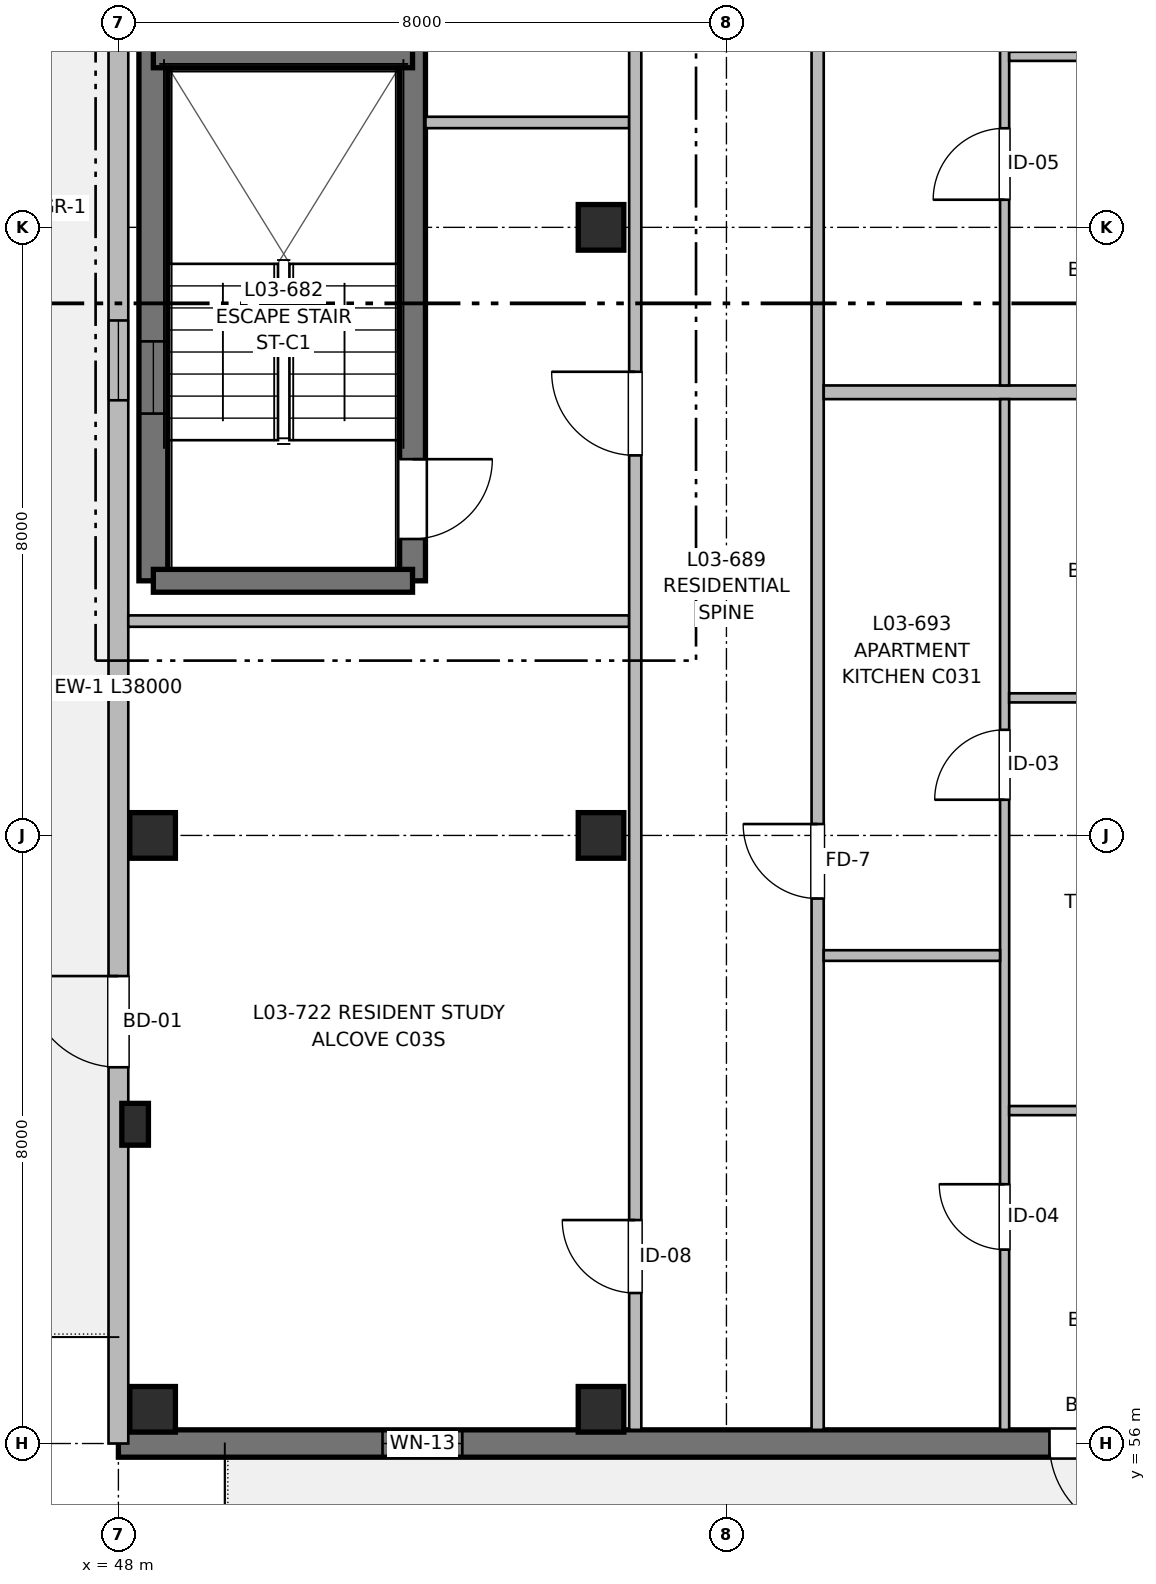
"""IFC4 building model, lengths in metres.
Left out: names, types, materials, properties, quantities, classifications, styles, units other than length and angle.
Written with IfcOpenShell. Run it as: python <this file> out.ifc"""

import sys

from ifc_helpers import new_model, si_unit, direction, frame, frame_2d, origin, origin_2d, place, context, subcontext, project, spatial, rectangle, extrude, element, fill, save


model = new_model("IFC4")
c1 = context("Model", 3, precision=1e-05, world=origin(), true_north=direction((0.0, 1.0)))
c2 = subcontext(c1, "Body", "Model", "MODEL_VIEW")
j1 = project(units=[si_unit("LENGTHUNIT", "METRE"), si_unit("PLANEANGLEUNIT", "RADIAN")], contexts=[c1])
p1 = place(None, origin())
s1 = spatial("IfcSite", under=j1, at=p1, CompositionType="ELEMENT")
p2 = place(p1, origin())
s2 = spatial("IfcBuilding", under=s1, at=p2, CompositionType="ELEMENT")
p3 = place(p2, frame((0.0, 0.0, 10.56)))
s3 = spatial("IfcBuildingStorey", under=s2, at=p3, CompositionType="ELEMENT", Elevation=10.56)
p4 = place(p3, frame((48.22, 60.2, 0.0), z_axis=(0.0, 0.0, 1.0), x_axis=(1.0, 0.0, 0.0)))
e1 = element("IfcColumn", 1, at=p4, inside=s3, PredefinedType="PILASTER", context=c2, shape_type="SweptSolid", body=[
    extrude(rectangle(XDim=0.35, YDim=0.55, at=origin_2d()), origin(), (0.0, 0.0, 1.0), 3.2),
])
for number, where, z_axis, x_axis in (
    (2, (48.45, 56.45, 0.0), (0.0, 0.0, 1.0), (1.0, 0.0, 0.0)),
    (3, (48.45, 64.0, 0.0), (0.0, 0.0, 1.0), (1.0, 0.0, 0.0)),
    (4, (54.35, 56.45, 0.0), (0.0, 0.0, 1.0), (1.0, 0.0, 0.0)),
    (5, (54.35, 64.0, 0.0), (0.0, 0.0, 1.0), (1.0, 0.0, 0.0)),
    (6, (54.35, 72.0, 0.0), (0.0, 0.0, 1.0), (1.0, 0.0, 0.0)),
):
    element("IfcColumn", number, at=place(p3, frame(where, z_axis=z_axis, x_axis=x_axis)), inside=s3, PredefinedType="COLUMN", context=c2, shape_type="SweptSolid", body=[
        extrude(rectangle(XDim=0.6, YDim=0.6, at=origin_2d()), origin(), (0.0, 0.0, 1.0), 3.2),
    ])
p5 = place(p3, frame((48.46, 67.35, 0.0), z_axis=(0.0, 0.0, 1.0), x_axis=(0.0, 1.0, 0.0)))
e7 = element("IfcWall", 7, at=p5, inside=s3, PredefinedType="SHEAR", context=c2, shape_type="SweptSolid", body=[
    extrude(rectangle(XDim=12.45, YDim=0.38, at=frame_2d((6.225, 0.0))), origin(), (0.0, 0.0, 1.0), 3.2),
])
p6 = place(p5, frame((2.2, 0.0, 0.97)))
e8 = element("IfcOpeningElement", 8, at=p6, cuts=e7, PredefinedType="OPENING", context=c2, shape_type="SweptSolid", body=[
    extrude(rectangle(XDim=0.95, YDim=1.25, at=frame_2d((0.475, 0.625))), frame((0.0, 0.2, 0.0), z_axis=(0.0, -1.0, 0.0), x_axis=(1.0, 0.0, 0.0)), (0.0, 0.0, 1.0), 0.4),
])
p7 = place(p3, frame((51.87, 79.8, 0.0), z_axis=(0.0, 0.0, 1.0), x_axis=(0.0, -1.0, 0.0)))
e9 = element("IfcWall", 9, at=p7, inside=s3, PredefinedType="SHEAR", context=c2, shape_type="SweptSolid", body=[
    extrude(rectangle(XDim=12.45, YDim=0.34, at=frame_2d((6.225, 0.0))), origin(), (0.0, 0.0, 1.0), 3.2),
])
p8 = place(p7, frame((10.85, 0.0, 0.0)))
e10 = element("IfcOpeningElement", 10, at=p8, cuts=e9, PredefinedType="OPENING", context=c2, shape_type="SweptSolid", body=[
    extrude(rectangle(XDim=1.05, YDim=2.15, at=frame_2d((0.525, 1.075))), frame((0.0, 0.18, 0.0), z_axis=(0.0, -1.0, 0.0), x_axis=(1.0, 0.0, 0.0)), (0.0, 0.0, 1.0), 0.36),
])
p9 = place(p3, frame((51.87, 67.35, 0.0), z_axis=(0.0, 0.0, 1.0), x_axis=(-1.0, 0.0, 0.0)))
e11 = element("IfcWall", 11, at=p9, inside=s3, PredefinedType="SHEAR", context=c2, shape_type="SweptSolid", body=[
    extrude(rectangle(XDim=3.41, YDim=0.3, at=frame_2d((1.705, 0.0))), origin(), (0.0, 0.0, 1.0), 3.2),
])
p10 = place(p3, frame((48.46, 74.24, 0.0), z_axis=(0.0, 0.0, 1.0), x_axis=(1.0, 0.0, 0.0)))
e12 = element("IfcWall", 12, at=p10, inside=s3, PredefinedType="SHEAR", context=c2, shape_type="SweptSolid", body=[
    extrude(rectangle(XDim=3.41, YDim=0.28, at=frame_2d((1.705, 0.0))), origin(), (0.0, 0.0, 1.0), 3.2),
])
p11 = place(p3, frame((64.0, 56.0, 0.0), z_axis=(0.0, 0.0, 1.0), x_axis=(-1.0, 0.0, 0.0)))
e13 = element("IfcWall", 13, at=p11, inside=s3, PredefinedType="SHEAR", context=c2, shape_type="SweptSolid", body=[
    extrude(rectangle(XDim=16.0, YDim=0.36, at=frame_2d((8.0, 0.0))), origin(), (0.0, 0.0, 1.0), 2.98),
])
p12 = place(p11, frame((2.55, 0.0, 0.0)))
e14 = element("IfcOpeningElement", 14, at=p12, cuts=e13, PredefinedType="OPENING", context=c2, shape_type="SweptSolid", body=[
    extrude(rectangle(XDim=1.2, YDim=2.2, at=frame_2d((0.6, 1.1))), frame((0.0, 0.19, 0.0), z_axis=(0.0, -1.0, 0.0), x_axis=(1.0, 0.0, 0.0)), (0.0, 0.0, 1.0), 0.38),
])
p13 = place(p11, frame((11.475, 0.0, 0.9)))
e15 = element("IfcOpeningElement", 15, at=p13, cuts=e13, PredefinedType="OPENING", context=c2, shape_type="SweptSolid", body=[
    extrude(rectangle(XDim=1.05, YDim=1.15, at=frame_2d((0.525, 0.575))), frame((0.0, 0.19, 0.0), z_axis=(0.0, -1.0, 0.0), x_axis=(1.0, 0.0, 0.0)), (0.0, 0.0, 1.0), 0.38),
])
p14 = place(p3, frame((48.0, 56.0, 0.0), z_axis=(0.0, 0.0, 1.0), x_axis=(0.0, 1.0, 0.0)))
e16 = element("IfcWall", 16, at=p14, inside=s3, PredefinedType="SOLIDWALL", context=c2, shape_type="SweptSolid", body=[
    extrude(rectangle(XDim=38.0, YDim=0.26, at=frame_2d((19.0, 0.0))), origin(), (0.0, 0.0, 1.0), 2.98),
])
p15 = place(p14, frame((4.95, 0.0, 0.0)))
e17 = element("IfcOpeningElement", 17, at=p15, cuts=e16, PredefinedType="OPENING", context=c2, shape_type="SweptSolid", body=[
    extrude(rectangle(XDim=1.2, YDim=2.2, at=frame_2d((0.6, 1.1))), frame((0.0, 0.14, 0.0), z_axis=(0.0, -1.0, 0.0), x_axis=(1.0, 0.0, 0.0)), (0.0, 0.0, 1.0), 0.28),
])
p16 = place(p14, frame((13.725, 0.0, 0.9)))
e18 = element("IfcOpeningElement", 18, at=p16, cuts=e16, PredefinedType="OPENING", context=c2, shape_type="SweptSolid", body=[
    extrude(rectangle(XDim=1.05, YDim=1.15, at=frame_2d((0.525, 0.575))), frame((0.0, 0.14, 0.0), z_axis=(0.0, -1.0, 0.0), x_axis=(1.0, 0.0, 0.0)), (0.0, 0.0, 1.0), 0.28),
])
p17 = place(p14, frame((24.0, 0.0, 0.9)))
e19 = element("IfcOpeningElement", 19, at=p17, cuts=e16, PredefinedType="OPENING", context=c2, shape_type="SweptSolid", body=[
    extrude(rectangle(XDim=1.2, YDim=1.05, at=frame_2d((0.6, 0.525))), frame((0.0, 0.14, 0.0), z_axis=(0.0, -1.0, 0.0), x_axis=(1.0, 0.0, 0.0)), (0.0, 0.0, 1.0), 0.28),
])
p18 = place(p14, frame((32.925, 0.0, 0.9)))
e20 = element("IfcOpeningElement", 20, at=p18, cuts=e16, PredefinedType="OPENING", context=c2, shape_type="SweptSolid", body=[
    extrude(rectangle(XDim=0.65, YDim=0.95, at=frame_2d((0.325, 0.475))), frame((0.0, 0.14, 0.0), z_axis=(0.0, -1.0, 0.0), x_axis=(1.0, 0.0, 0.0)), (0.0, 0.0, 1.0), 0.28),
])
p19 = place(p3, frame((48.13, 66.82, 0.0), z_axis=(0.0, 0.0, 1.0), x_axis=(1.0, 0.0, 0.0)))
e21 = element("IfcWall", 21, at=p19, inside=s3, PredefinedType="PARTITIONING", context=c2, shape_type="SweptSolid", body=[
    extrude(rectangle(XDim=6.59, YDim=0.15, at=frame_2d((3.295, 0.0))), origin(), (0.0, 0.0, 1.0), 2.935),
])
p20 = place(p3, frame((52.04, 73.38, 0.0), z_axis=(0.0, 0.0, 1.0), x_axis=(1.0, 0.0, 0.0)))
e22 = element("IfcWall", 22, at=p20, inside=s3, PredefinedType="PARTITIONING", context=c2, shape_type="SweptSolid", body=[
    extrude(rectangle(XDim=2.68, YDim=0.15, at=frame_2d((1.34, 0.0))), origin(), (0.0, 0.0, 1.0), 2.935),
])
p21 = place(p3, frame((54.8, 56.18, 0.0), z_axis=(0.0, 0.0, 1.0), x_axis=(0.0, 1.0, 0.0)))
e23 = element("IfcWall", 23, at=p21, inside=s3, PredefinedType="PARTITIONING", context=c2, shape_type="SweptSolid", body=[
    extrude(rectangle(XDim=50.62, YDim=0.16, at=frame_2d((25.31, 0.0))), origin(), (0.0, 0.0, 1.0), 2.935),
])
p22 = place(p21, frame((12.82, 0.0, 0.0)))
e24 = element("IfcOpeningElement", 24, at=p22, cuts=e23, PredefinedType="OPENING", context=c2, shape_type="SweptSolid", body=[
    extrude(rectangle(XDim=1.1, YDim=2.15, at=frame_2d((0.55, 1.075))), frame((0.0, 0.09, 0.0), z_axis=(0.0, -1.0, 0.0), x_axis=(1.0, 0.0, 0.0)), (0.0, 0.0, 1.0), 0.18),
])
p23 = place(p21, frame((19.22, 0.0, 0.0)))
e25 = element("IfcOpeningElement", 25, at=p23, cuts=e23, PredefinedType="OPENING", context=c2, shape_type="SweptSolid", body=[
    extrude(rectangle(XDim=1.6, YDim=2.15, at=frame_2d((0.8, 1.075))), frame((0.0, 0.09, 0.0), z_axis=(0.0, -1.0, 0.0), x_axis=(1.0, 0.0, 0.0)), (0.0, 0.0, 1.0), 0.18),
])
p24 = place(p21, frame((1.8, 0.0, 0.0)))
e26 = element("IfcOpeningElement", 26, at=p24, cuts=e23, PredefinedType="OPENING", context=c2, shape_type="SweptSolid", body=[
    extrude(rectangle(XDim=0.96, YDim=2.15, at=frame_2d((0.48, 1.075))), frame((0.0, 0.09, 0.0), z_axis=(0.0, -1.0, 0.0), x_axis=(1.0, 0.0, 0.0)), (0.0, 0.0, 1.0), 0.18),
])
p25 = place(p21, frame((32.825, 0.0, 0.0)))
e27 = element("IfcOpeningElement", 27, at=p25, cuts=e23, PredefinedType="OPENING", context=c2, shape_type="SweptSolid", body=[
    extrude(rectangle(XDim=0.98, YDim=2.15, at=frame_2d((0.49, 1.075))), frame((0.0, 0.09, 0.0), z_axis=(0.0, -1.0, 0.0), x_axis=(1.0, 0.0, 0.0)), (0.0, 0.0, 1.0), 0.18),
])
p26 = place(p21, frame((40.635, 0.0, 0.0)))
e28 = element("IfcOpeningElement", 28, at=p26, cuts=e23, PredefinedType="OPENING", context=c2, shape_type="SweptSolid", body=[
    extrude(rectangle(XDim=0.98, YDim=2.15, at=frame_2d((0.49, 1.075))), frame((0.0, 0.09, 0.0), z_axis=(0.0, -1.0, 0.0), x_axis=(1.0, 0.0, 0.0)), (0.0, 0.0, 1.0), 0.18),
])
p27 = place(p3, frame((57.2, 56.18, 0.0), z_axis=(0.0, 0.0, 1.0), x_axis=(0.0, 1.0, 0.0)))
e29 = element("IfcWall", 29, at=p27, inside=s3, PredefinedType="PARTITIONING", context=c2, shape_type="SweptSolid", body=[
    extrude(rectangle(XDim=50.62, YDim=0.16, at=frame_2d((25.31, 0.0))), origin(), (0.0, 0.0, 1.0), 2.935),
])
p28 = place(p27, frame((6.99, 0.0, 0.0)))
e30 = element("IfcOpeningElement", 30, at=p28, cuts=e29, PredefinedType="OPENING", context=c2, shape_type="SweptSolid", body=[
    extrude(rectangle(XDim=0.98, YDim=2.15, at=frame_2d((0.49, 1.075))), frame((0.0, 0.09, 0.0), z_axis=(0.0, -1.0, 0.0), x_axis=(1.0, 0.0, 0.0)), (0.0, 0.0, 1.0), 0.18),
])
p29 = place(p27, frame((20.92, 0.0, 0.0)))
e31 = element("IfcOpeningElement", 31, at=p29, cuts=e29, PredefinedType="OPENING", context=c2, shape_type="SweptSolid", body=[
    extrude(rectangle(XDim=1.02, YDim=2.15, at=frame_2d((0.51, 1.075))), frame((0.0, 0.09, 0.0), z_axis=(0.0, -1.0, 0.0), x_axis=(1.0, 0.0, 0.0)), (0.0, 0.0, 1.0), 0.18),
])
p30 = place(p27, frame((33.67, 0.0, 0.0)))
e32 = element("IfcOpeningElement", 32, at=p30, cuts=e29, PredefinedType="OPENING", context=c2, shape_type="SweptSolid", body=[
    extrude(rectangle(XDim=0.98, YDim=2.15, at=frame_2d((0.49, 1.075))), frame((0.0, 0.09, 0.0), z_axis=(0.0, -1.0, 0.0), x_axis=(1.0, 0.0, 0.0)), (0.0, 0.0, 1.0), 0.18),
])
p31 = place(p27, frame((45.06, 0.0, 0.0)))
e33 = element("IfcOpeningElement", 33, at=p31, cuts=e29, PredefinedType="OPENING", context=c2, shape_type="SweptSolid", body=[
    extrude(rectangle(XDim=0.98, YDim=2.15, at=frame_2d((0.49, 1.075))), frame((0.0, 0.09, 0.0), z_axis=(0.0, -1.0, 0.0), x_axis=(1.0, 0.0, 0.0)), (0.0, 0.0, 1.0), 0.18),
])
p32 = place(p3, frame((57.28, 69.83, 0.0), z_axis=(0.0, 0.0, 1.0), x_axis=(1.0, 0.0, 0.0)))
e34 = element("IfcWall", 34, at=p32, inside=s3, PredefinedType="PARTITIONING", context=c2, shape_type="SweptSolid", body=[
    extrude(rectangle(XDim=6.59, YDim=0.18, at=frame_2d((3.295, 0.0))), origin(), (0.0, 0.0, 1.0), 2.935),
])
p33 = place(p3, frame((59.66, 56.18, 0.0), z_axis=(0.0, 0.0, 1.0), x_axis=(0.0, 1.0, 0.0)))
e35 = element("IfcWall", 35, at=p33, inside=s3, PredefinedType="PARTITIONING", context=c2, shape_type="SweptSolid", body=[
    extrude(rectangle(XDim=13.56, YDim=0.12, at=frame_2d((6.78, 0.0))), origin(), (0.0, 0.0, 1.0), 2.935),
])
p34 = place(p33, frame((2.371, 0.0, 0.0)))
e36 = element("IfcOpeningElement", 36, at=p34, cuts=e35, PredefinedType="OPENING", context=c2, shape_type="SweptSolid", body=[
    extrude(rectangle(XDim=0.86, YDim=2.1, at=frame_2d((0.43, 1.05))), frame((0.0, 0.07, 0.0), z_axis=(0.0, -1.0, 0.0), x_axis=(1.0, 0.0, 0.0)), (0.0, 0.0, 1.0), 0.14),
])
p35 = place(p33, frame((8.29, 0.0, 0.0)))
e37 = element("IfcOpeningElement", 37, at=p35, cuts=e35, PredefinedType="OPENING", context=c2, shape_type="SweptSolid", body=[
    extrude(rectangle(XDim=0.92, YDim=2.1, at=frame_2d((0.46, 1.05))), frame((0.0, 0.07, 0.0), z_axis=(0.0, -1.0, 0.0), x_axis=(1.0, 0.0, 0.0)), (0.0, 0.0, 1.0), 0.14),
])
p36 = place(p3, frame((57.28, 62.42, 0.0), z_axis=(0.0, 0.0, 1.0), x_axis=(1.0, 0.0, 0.0)))
e38 = element("IfcWall", 38, at=p36, inside=s3, PredefinedType="PARTITIONING", context=c2, shape_type="SweptSolid", body=[
    extrude(rectangle(XDim=2.32, YDim=0.14, at=frame_2d((1.16, 0.0))), origin(), (0.0, 0.0, 1.0), 2.935),
])
p37 = place(p3, frame((59.72, 60.38, 0.0), z_axis=(0.0, 0.0, 1.0), x_axis=(1.0, 0.0, 0.0)))
e39 = element("IfcWall", 39, at=p37, inside=s3, PredefinedType="PARTITIONING", context=c2, shape_type="SweptSolid", body=[
    extrude(rectangle(XDim=4.15, YDim=0.12, at=frame_2d((2.075, 0.0))), origin(), (0.0, 0.0, 1.0), 2.935),
])
p38 = place(p37, frame((1.625, 0.0, 0.0)))
e40 = element("IfcOpeningElement", 40, at=p38, cuts=e39, PredefinedType="OPENING", context=c2, shape_type="SweptSolid", body=[
    extrude(rectangle(XDim=0.9, YDim=2.1, at=frame_2d((0.45, 1.05))), frame((0.0, 0.07, 0.0), z_axis=(0.0, -1.0, 0.0), x_axis=(1.0, 0.0, 0.0)), (0.0, 0.0, 1.0), 0.14),
])
p39 = place(p3, frame((59.72, 65.81, 0.0), z_axis=(0.0, 0.0, 1.0), x_axis=(1.0, 0.0, 0.0)))
e41 = element("IfcWall", 41, at=p39, inside=s3, PredefinedType="PARTITIONING", context=c2, shape_type="SweptSolid", body=[
    extrude(rectangle(XDim=4.15, YDim=0.12, at=frame_2d((2.075, 0.0))), origin(), (0.0, 0.0, 1.0), 2.935),
])
p40 = place(p39, frame((1.635, 0.0, 0.0)))
e42 = element("IfcOpeningElement", 42, at=p40, cuts=e41, PredefinedType="OPENING", context=c2, shape_type="SweptSolid", body=[
    extrude(rectangle(XDim=0.88, YDim=2.1, at=frame_2d((0.44, 1.05))), frame((0.0, 0.07, 0.0), z_axis=(0.0, -1.0, 0.0), x_axis=(1.0, 0.0, 0.0)), (0.0, 0.0, 1.0), 0.14),
])
p41 = place(p3, frame((59.66, 69.92, 0.0), z_axis=(0.0, 0.0, 1.0), x_axis=(0.0, 1.0, 0.0)))
e43 = element("IfcWall", 43, at=p41, inside=s3, PredefinedType="PARTITIONING", context=c2, shape_type="SweptSolid", body=[
    extrude(rectangle(XDim=13.97, YDim=0.12, at=frame_2d((6.985, 0.0))), origin(), (0.0, 0.0, 1.0), 2.935),
])
p42 = place(p41, frame((2.443, 0.0, 0.0)))
e44 = element("IfcOpeningElement", 44, at=p42, cuts=e43, PredefinedType="OPENING", context=c2, shape_type="SweptSolid", body=[
    extrude(rectangle(XDim=0.94, YDim=2.1, at=frame_2d((0.47, 1.05))), frame((0.0, 0.07, 0.0), z_axis=(0.0, -1.0, 0.0), x_axis=(1.0, 0.0, 0.0)), (0.0, 0.0, 1.0), 0.14),
])
p43 = place(p41, frame((8.541, 0.0, 0.0)))
e45 = element("IfcOpeningElement", 45, at=p43, cuts=e43, PredefinedType="OPENING", context=c2, shape_type="SweptSolid", body=[
    extrude(rectangle(XDim=0.92, YDim=2.1, at=frame_2d((0.46, 1.05))), frame((0.0, 0.07, 0.0), z_axis=(0.0, -1.0, 0.0), x_axis=(1.0, 0.0, 0.0)), (0.0, 0.0, 1.0), 0.14),
])
p44 = place(p3, frame((59.72, 74.25, 0.0), z_axis=(0.0, 0.0, 1.0), x_axis=(1.0, 0.0, 0.0)))
e46 = element("IfcWall", 46, at=p44, inside=s3, PredefinedType="PARTITIONING", context=c2, shape_type="SweptSolid", body=[
    extrude(rectangle(XDim=4.15, YDim=0.12, at=frame_2d((2.075, 0.0))), origin(), (0.0, 0.0, 1.0), 2.935),
])
p45 = place(p44, frame((1.625, 0.0, 0.0)))
e47 = element("IfcOpeningElement", 47, at=p45, cuts=e46, PredefinedType="OPENING", context=c2, shape_type="SweptSolid", body=[
    extrude(rectangle(XDim=0.9, YDim=2.1, at=frame_2d((0.45, 1.05))), frame((0.0, 0.07, 0.0), z_axis=(0.0, -1.0, 0.0), x_axis=(1.0, 0.0, 0.0)), (0.0, 0.0, 1.0), 0.14),
])
p46 = place(p8, origin())
e48 = element("IfcDoor", 48, at=p46, inside=s3, OperationType="SINGLE_SWING_LEFT", PredefinedType="DOOR", context=c2, shape_type="SweptSolid", body=[
    extrude(rectangle(XDim=1.05, YDim=2.15, at=frame_2d((0.525, 1.075))), frame((0.0, 0.025, 0.0), z_axis=(0.0, -1.0, 0.0), x_axis=(1.0, 0.0, 0.0)), (0.0, 0.0, 1.0), 0.05),
])
fill(e10, e48)
p47 = place(p6, origin())
e49 = element("IfcWindow", 49, at=p47, inside=s3, PartitioningType="SINGLE_PANEL", PredefinedType="WINDOW", context=c2, shape_type="SweptSolid", body=[
    extrude(rectangle(XDim=0.95, YDim=1.25, at=frame_2d((0.475, 0.625))), frame((0.0, 0.03, 0.0), z_axis=(0.0, -1.0, 0.0), x_axis=(1.0, 0.0, 0.0)), (0.0, 0.0, 1.0), 0.06),
])
fill(e8, e49)
p48 = place(p12, origin())
e50 = element("IfcDoor", 50, at=p48, inside=s3, OperationType="SINGLE_SWING_LEFT", PredefinedType="DOOR", context=c2, shape_type="SweptSolid", body=[
    extrude(rectangle(XDim=1.2, YDim=2.2, at=frame_2d((0.6, 1.1))), frame((0.0, 0.025, 0.0), z_axis=(0.0, -1.0, 0.0), x_axis=(1.0, 0.0, 0.0)), (0.0, 0.0, 1.0), 0.05),
])
fill(e14, e50)
p49 = place(p13, origin())
e51 = element("IfcWindow", 51, at=p49, inside=s3, PartitioningType="SINGLE_PANEL", PredefinedType="WINDOW", context=c2, shape_type="SweptSolid", body=[
    extrude(rectangle(XDim=1.05, YDim=1.15, at=frame_2d((0.525, 0.575))), frame((0.0, 0.03, 0.0), z_axis=(0.0, -1.0, 0.0), x_axis=(1.0, 0.0, 0.0)), (0.0, 0.0, 1.0), 0.06),
])
fill(e15, e51)
p50 = place(p15, origin())
e52 = element("IfcDoor", 52, at=p50, inside=s3, OperationType="SINGLE_SWING_RIGHT", PredefinedType="DOOR", context=c2, shape_type="SweptSolid", body=[
    extrude(rectangle(XDim=1.2, YDim=2.2, at=frame_2d((0.6, 1.1))), frame((0.0, 0.025, 0.0), z_axis=(0.0, -1.0, 0.0), x_axis=(1.0, 0.0, 0.0)), (0.0, 0.0, 1.0), 0.05),
])
fill(e17, e52)
p51 = place(p16, origin())
e53 = element("IfcWindow", 53, at=p51, inside=s3, PartitioningType="SINGLE_PANEL", PredefinedType="WINDOW", context=c2, shape_type="SweptSolid", body=[
    extrude(rectangle(XDim=1.05, YDim=1.15, at=frame_2d((0.525, 0.575))), frame((0.0, 0.03, 0.0), z_axis=(0.0, -1.0, 0.0), x_axis=(1.0, 0.0, 0.0)), (0.0, 0.0, 1.0), 0.06),
])
fill(e18, e53)
p52 = place(p22, origin())
e54 = element("IfcDoor", 54, at=p52, inside=s3, OperationType="SINGLE_SWING_RIGHT", PredefinedType="DOOR", context=c2, shape_type="SweptSolid", body=[
    extrude(rectangle(XDim=1.1, YDim=2.15, at=frame_2d((0.55, 1.075))), frame((0.0, 0.025, 0.0), z_axis=(0.0, -1.0, 0.0), x_axis=(1.0, 0.0, 0.0)), (0.0, 0.0, 1.0), 0.05),
])
fill(e24, e54)
p53 = place(p34, origin())
e55 = element("IfcDoor", 55, at=p53, inside=s3, OperationType="SINGLE_SWING_RIGHT", PredefinedType="DOOR", context=c2, shape_type="SweptSolid", body=[
    extrude(rectangle(XDim=0.86, YDim=2.1, at=frame_2d((0.43, 1.05))), frame((0.0, 0.025, 0.0), z_axis=(0.0, -1.0, 0.0), x_axis=(1.0, 0.0, 0.0)), (0.0, 0.0, 1.0), 0.05),
])
fill(e36, e55)
p54 = place(p35, origin())
e56 = element("IfcDoor", 56, at=p54, inside=s3, OperationType="SINGLE_SWING_LEFT", PredefinedType="DOOR", context=c2, shape_type="SweptSolid", body=[
    extrude(rectangle(XDim=0.92, YDim=2.1, at=frame_2d((0.46, 1.05))), frame((0.0, 0.025, 0.0), z_axis=(0.0, -1.0, 0.0), x_axis=(1.0, 0.0, 0.0)), (0.0, 0.0, 1.0), 0.05),
])
fill(e37, e56)
p55 = place(p28, origin())
e57 = element("IfcDoor", 57, at=p55, inside=s3, OperationType="SINGLE_SWING_RIGHT", PredefinedType="DOOR", context=c2, shape_type="SweptSolid", body=[
    extrude(rectangle(XDim=0.98, YDim=2.15, at=frame_2d((0.49, 1.075))), frame((0.0, 0.025, 0.0), z_axis=(0.0, -1.0, 0.0), x_axis=(1.0, 0.0, 0.0)), (0.0, 0.0, 1.0), 0.05),
])
fill(e30, e57)
p56 = place(p42, origin())
e58 = element("IfcDoor", 58, at=p56, inside=s3, OperationType="SINGLE_SWING_LEFT", PredefinedType="DOOR", context=c2, shape_type="SweptSolid", body=[
    extrude(rectangle(XDim=0.94, YDim=2.1, at=frame_2d((0.47, 1.05))), frame((0.0, 0.025, 0.0), z_axis=(0.0, -1.0, 0.0), x_axis=(1.0, 0.0, 0.0)), (0.0, 0.0, 1.0), 0.05),
])
fill(e44, e58)
p57 = place(p24, origin())
e59 = element("IfcDoor", 59, at=p57, inside=s3, OperationType="SINGLE_SWING_RIGHT", PredefinedType="DOOR", context=c2, shape_type="SweptSolid", body=[
    extrude(rectangle(XDim=0.96, YDim=2.15, at=frame_2d((0.48, 1.075))), frame((0.0, 0.025, 0.0), z_axis=(0.0, -1.0, 0.0), x_axis=(1.0, 0.0, 0.0)), (0.0, 0.0, 1.0), 0.05),
])
fill(e26, e59)
save(model, sys.argv[1])
